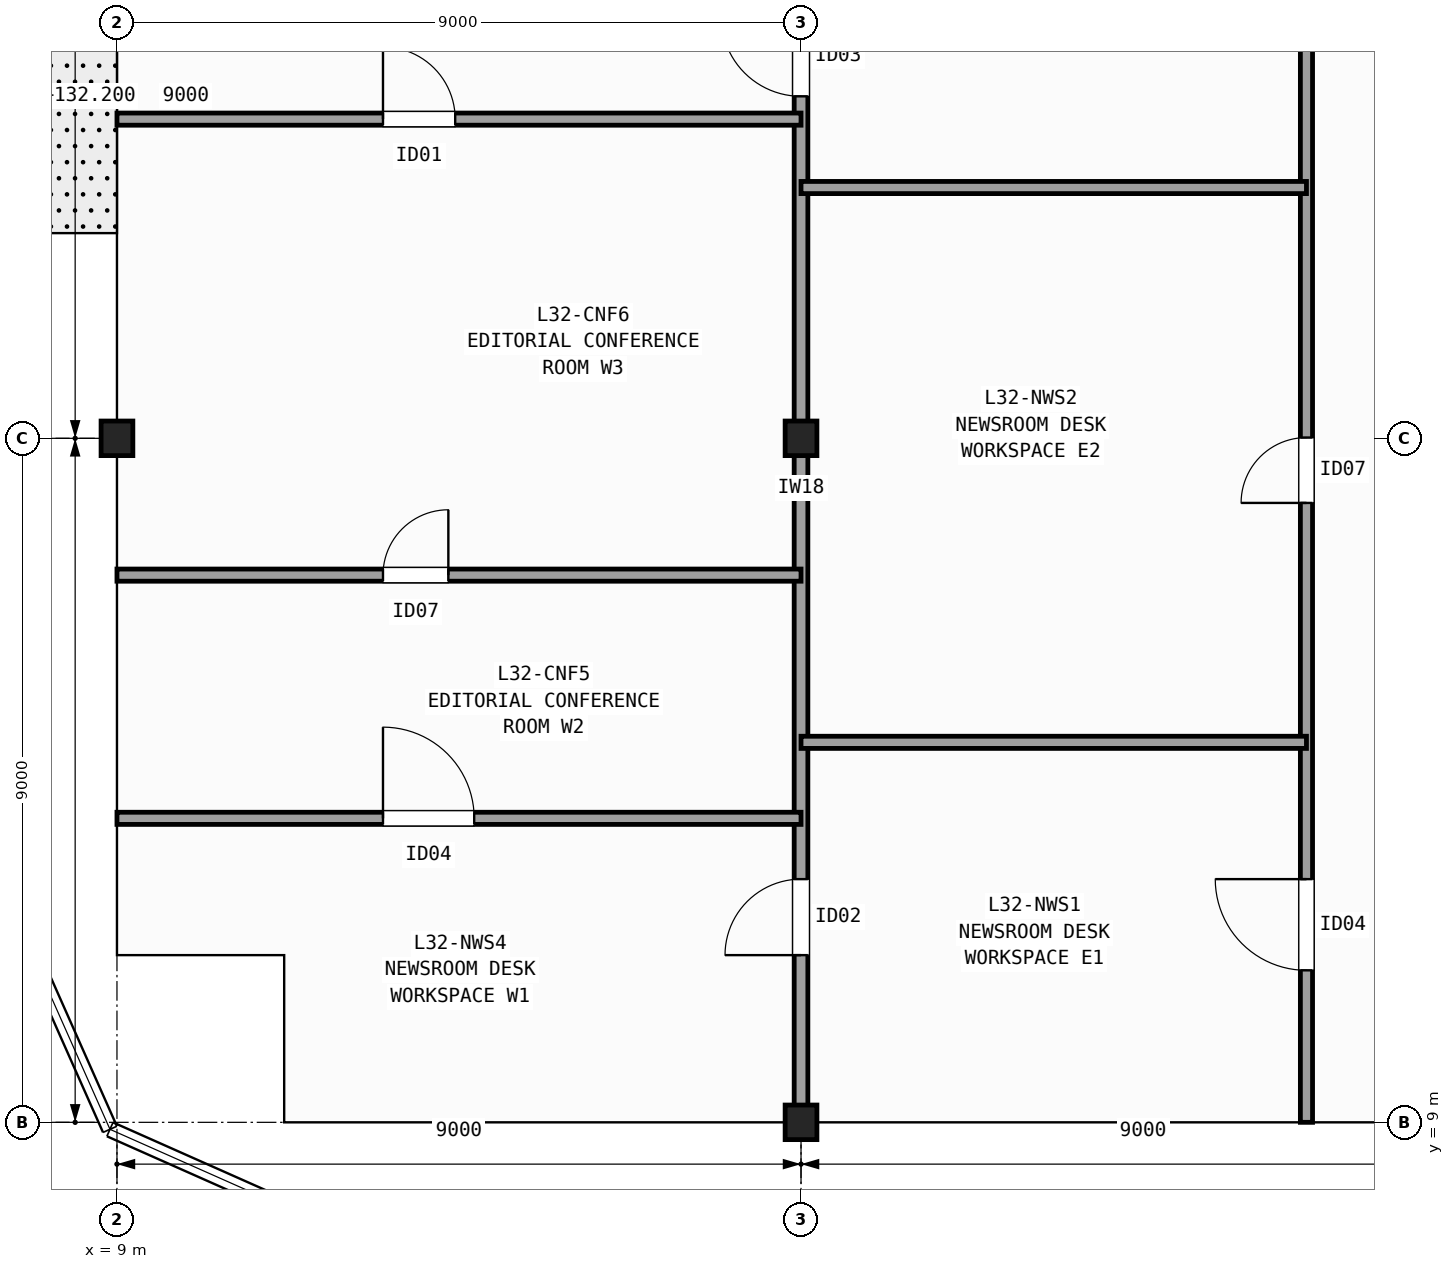
"""IFC4 building model, lengths in metres.
Left out: names, types, materials, properties, quantities, classifications, styles, units other than length and angle.
Written with IfcOpenShell. Run it as: python <this file> out.ifc"""

import sys

from ifc_helpers import new_model, si_unit, direction, frame, frame_2d, origin, origin_2d, place, context, subcontext, project, spatial, rectangle, i_section, extrude, element, fill, save


model = new_model("IFC4")
c1 = context("Model", 3, precision=1e-05, world=origin(), true_north=direction((0.0, 1.0)))
c2 = subcontext(c1, "Body", "Model", "MODEL_VIEW")
j1 = project(units=[si_unit("LENGTHUNIT", "METRE"), si_unit("PLANEANGLEUNIT", "RADIAN")], contexts=[c1])
p1 = place(None, origin())
s1 = spatial("IfcSite", under=j1, at=p1, CompositionType="ELEMENT")
p2 = place(p1, origin())
s2 = spatial("IfcBuilding", under=s1, at=p2, CompositionType="ELEMENT")
p3 = place(p2, frame((0.0, 0.0, 132.2)))
s3 = spatial("IfcBuildingStorey", under=s2, at=p3, CompositionType="ELEMENT", Elevation=132.2)
for number, where, z_axis, x_axis in (
    (1, (9.0, 18.0, 0.0), (0.0, 0.0, 1.0), (1.0, 0.0, 0.0)),
    (2, (18.0, 9.0, 0.0), (0.0, 0.0, 1.0), (1.0, 0.0, 0.0)),
    (3, (18.0, 18.0, 0.0), (0.0, 0.0, 1.0), (1.0, 0.0, 0.0)),
):
    element("IfcColumn", number, at=place(p3, frame(where, z_axis=z_axis, x_axis=x_axis)), inside=s3, PredefinedType="COLUMN", context=c2, shape_type="SweptSolid", body=[
        extrude(i_section(OverallWidth=0.418, OverallDepth=0.455, WebThickness=0.042, FlangeThickness=0.068, FilletRadius=0.015, at=origin_2d()), origin(), (0.0, 0.0, 1.0), 3.7),
    ])
p4 = place(p3, frame((24.65, 9.0, 0.0), z_axis=(0.0, 0.0, 1.0), x_axis=(0.0, 1.0, 0.0)))
e4 = element("IfcWall", 4, at=p4, inside=s3, PredefinedType="PARTITIONING", context=c2, shape_type="SweptSolid", body=[
    extrude(rectangle(XDim=19.2, YDim=0.16, at=frame_2d((9.6, 0.0))), origin(), (0.0, 0.0, 1.0), 2.634),
])
p5 = place(p4, frame((2.0, 0.0, 0.0)))
e5 = element("IfcOpeningElement", 5, at=p5, cuts=e4, PredefinedType="OPENING", context=c2, shape_type="SweptSolid", body=[
    extrude(rectangle(XDim=1.2, YDim=2.15, at=frame_2d((0.6, 1.075))), frame((0.0, 0.09, 0.0), z_axis=(0.0, -1.0, 0.0), x_axis=(1.0, 0.0, 0.0)), (0.0, 0.0, 1.0), 0.18),
])
p6 = place(p4, frame((8.15, 0.0, 0.0)))
e6 = element("IfcOpeningElement", 6, at=p6, cuts=e4, PredefinedType="OPENING", context=c2, shape_type="SweptSolid", body=[
    extrude(rectangle(XDim=0.86, YDim=2.05, at=frame_2d((0.43, 1.025))), frame((0.0, 0.09, 0.0), z_axis=(0.0, -1.0, 0.0), x_axis=(1.0, 0.0, 0.0)), (0.0, 0.0, 1.0), 0.18),
])
p7 = place(p4, frame((15.215, 0.0, 0.0)))
e7 = element("IfcOpeningElement", 7, at=p7, cuts=e4, PredefinedType="OPENING", context=c2, shape_type="SweptSolid", body=[
    extrude(rectangle(XDim=0.95, YDim=2.1, at=frame_2d((0.475, 1.05))), frame((0.0, 0.09, 0.0), z_axis=(0.0, -1.0, 0.0), x_axis=(1.0, 0.0, 0.0)), (0.0, 0.0, 1.0), 0.18),
])
p8 = place(p3, frame((18.0, 9.0, 0.0), z_axis=(0.0, 0.0, 1.0), x_axis=(0.0, 1.0, 0.0)))
e8 = element("IfcWall", 8, at=p8, inside=s3, PredefinedType="PARTITIONING", context=c2, shape_type="SweptSolid", body=[
    extrude(rectangle(XDim=19.13, YDim=0.18, at=frame_2d((9.565, 0.0))), origin(), (0.0, 0.0, 1.0), 2.634),
])
p9 = place(p8, frame((2.2, 0.0, 0.0)))
e9 = element("IfcOpeningElement", 9, at=p9, cuts=e8, PredefinedType="OPENING", context=c2, shape_type="SweptSolid", body=[
    extrude(rectangle(XDim=1.0, YDim=2.1, at=frame_2d((0.5, 1.05))), frame((0.0, 0.1, 0.0), z_axis=(0.0, -1.0, 0.0), x_axis=(1.0, 0.0, 0.0)), (0.0, 0.0, 1.0), 0.2),
])
p10 = place(p8, frame((13.5, 0.0, 0.0)))
e10 = element("IfcOpeningElement", 10, at=p10, cuts=e8, PredefinedType="OPENING", context=c2, shape_type="SweptSolid", body=[
    extrude(rectangle(XDim=1.05, YDim=2.15, at=frame_2d((0.525, 1.075))), frame((0.0, 0.1, 0.0), z_axis=(0.0, -1.0, 0.0), x_axis=(1.0, 0.0, 0.0)), (0.0, 0.0, 1.0), 0.2),
])
p11 = place(p3, frame((18.0, 14.0, 0.0), z_axis=(0.0, 0.0, 1.0), x_axis=(1.0, 0.0, 0.0)))
e11 = element("IfcWall", 11, at=p11, inside=s3, PredefinedType="PARTITIONING", context=c2, shape_type="SweptSolid", body=[
    extrude(rectangle(XDim=6.65, YDim=0.16, at=frame_2d((3.325, 0.0))), origin(), (0.0, 0.0, 1.0), 2.789),
])
p12 = place(p3, frame((18.0, 21.3, 0.0), z_axis=(0.0, 0.0, 1.0), x_axis=(1.0, 0.0, 0.0)))
e12 = element("IfcWall", 12, at=p12, inside=s3, PredefinedType="PARTITIONING", context=c2, shape_type="SweptSolid", body=[
    extrude(rectangle(XDim=6.65, YDim=0.16, at=frame_2d((3.325, 0.0))), origin(), (0.0, 0.0, 1.0), 2.792),
])
p13 = place(p3, frame((9.0, 13.0, 0.0), z_axis=(0.0, 0.0, 1.0), x_axis=(1.0, 0.0, 0.0)))
e13 = element("IfcWall", 13, at=p13, inside=s3, PredefinedType="PARTITIONING", context=c2, shape_type="SweptSolid", body=[
    extrude(rectangle(XDim=9.0, YDim=0.16, at=frame_2d((4.5, 0.0))), origin(), (0.0, 0.0, 1.0), 2.792),
])
p14 = place(p13, frame((3.5, 0.0, 0.0)))
e14 = element("IfcOpeningElement", 14, at=p14, cuts=e13, PredefinedType="OPENING", context=c2, shape_type="SweptSolid", body=[
    extrude(rectangle(XDim=1.2, YDim=2.15, at=frame_2d((0.6, 1.075))), frame((0.0, 0.09, 0.0), z_axis=(0.0, -1.0, 0.0), x_axis=(1.0, 0.0, 0.0)), (0.0, 0.0, 1.0), 0.18),
])
p15 = place(p3, frame((9.0, 16.2, 0.0), z_axis=(0.0, 0.0, 1.0), x_axis=(1.0, 0.0, 0.0)))
e15 = element("IfcWall", 15, at=p15, inside=s3, PredefinedType="PARTITIONING", context=c2, shape_type="SweptSolid", body=[
    extrude(rectangle(XDim=9.0, YDim=0.16, at=frame_2d((4.5, 0.0))), origin(), (0.0, 0.0, 1.0), 2.792),
])
p16 = place(p15, frame((3.5, 0.0, 0.0)))
e16 = element("IfcOpeningElement", 16, at=p16, cuts=e15, PredefinedType="OPENING", context=c2, shape_type="SweptSolid", body=[
    extrude(rectangle(XDim=0.86, YDim=2.05, at=frame_2d((0.43, 1.025))), frame((0.0, 0.09, 0.0), z_axis=(0.0, -1.0, 0.0), x_axis=(1.0, 0.0, 0.0)), (0.0, 0.0, 1.0), 0.18),
])
p17 = place(p3, frame((9.0, 22.2, 0.0), z_axis=(0.0, 0.0, 1.0), x_axis=(1.0, 0.0, 0.0)))
e17 = element("IfcWall", 17, at=p17, inside=s3, PredefinedType="PARTITIONING", context=c2, shape_type="SweptSolid", body=[
    extrude(rectangle(XDim=9.0, YDim=0.16, at=frame_2d((4.5, 0.0))), origin(), (0.0, 0.0, 1.0), 2.634),
])
p18 = place(p17, frame((3.5, 0.0, 0.0)))
e18 = element("IfcOpeningElement", 18, at=p18, cuts=e17, PredefinedType="OPENING", context=c2, shape_type="SweptSolid", body=[
    extrude(rectangle(XDim=0.95, YDim=2.1, at=frame_2d((0.475, 1.05))), frame((0.0, 0.09, 0.0), z_axis=(0.0, -1.0, 0.0), x_axis=(1.0, 0.0, 0.0)), (0.0, 0.0, 1.0), 0.18),
])
p19 = place(p5, origin())
e19 = element("IfcDoor", 19, at=p19, inside=s3, OperationType="SINGLE_SWING_RIGHT", PredefinedType="DOOR", context=c2, shape_type="SweptSolid", body=[
    extrude(rectangle(XDim=1.2, YDim=2.15, at=frame_2d((0.6, 1.075))), frame((0.0, 0.025, 0.0), z_axis=(0.0, -1.0, 0.0), x_axis=(1.0, 0.0, 0.0)), (0.0, 0.0, 1.0), 0.05),
])
fill(e5, e19)
p20 = place(p6, origin())
e20 = element("IfcDoor", 20, at=p20, inside=s3, OperationType="SINGLE_SWING_LEFT", PredefinedType="DOOR", context=c2, shape_type="SweptSolid", body=[
    extrude(rectangle(XDim=0.86, YDim=2.05, at=frame_2d((0.43, 1.025))), frame((0.0, 0.025, 0.0), z_axis=(0.0, -1.0, 0.0), x_axis=(1.0, 0.0, 0.0)), (0.0, 0.0, 1.0), 0.05),
])
fill(e6, e20)
p21 = place(p9, origin())
e21 = element("IfcDoor", 21, at=p21, inside=s3, OperationType="SINGLE_SWING_LEFT", PredefinedType="DOOR", context=c2, shape_type="SweptSolid", body=[
    extrude(rectangle(XDim=1.0, YDim=2.1, at=frame_2d((0.5, 1.05))), frame((0.0, 0.025, 0.0), z_axis=(0.0, -1.0, 0.0), x_axis=(1.0, 0.0, 0.0)), (0.0, 0.0, 1.0), 0.05),
])
fill(e9, e21)
p22 = place(p10, origin())
e22 = element("IfcDoor", 22, at=p22, inside=s3, OperationType="SINGLE_SWING_RIGHT", PredefinedType="DOOR", context=c2, shape_type="SweptSolid", body=[
    extrude(rectangle(XDim=1.05, YDim=2.15, at=frame_2d((0.525, 1.075))), frame((0.0, 0.025, 0.0), z_axis=(0.0, -1.0, 0.0), x_axis=(1.0, 0.0, 0.0)), (0.0, 0.0, 1.0), 0.05),
])
fill(e10, e22)
p23 = place(p14, origin())
e23 = element("IfcDoor", 23, at=p23, inside=s3, OperationType="SINGLE_SWING_LEFT", PredefinedType="DOOR", context=c2, shape_type="SweptSolid", body=[
    extrude(rectangle(XDim=1.2, YDim=2.15, at=frame_2d((0.6, 1.075))), frame((0.0, 0.025, 0.0), z_axis=(0.0, -1.0, 0.0), x_axis=(1.0, 0.0, 0.0)), (0.0, 0.0, 1.0), 0.05),
])
fill(e14, e23)
p24 = place(p16, origin())
e24 = element("IfcDoor", 24, at=p24, inside=s3, OperationType="SINGLE_SWING_RIGHT", PredefinedType="DOOR", context=c2, shape_type="SweptSolid", body=[
    extrude(rectangle(XDim=0.86, YDim=2.05, at=frame_2d((0.43, 1.025))), frame((0.0, 0.025, 0.0), z_axis=(0.0, -1.0, 0.0), x_axis=(1.0, 0.0, 0.0)), (0.0, 0.0, 1.0), 0.05),
])
fill(e16, e24)
p25 = place(p18, origin())
e25 = element("IfcDoor", 25, at=p25, inside=s3, OperationType="SINGLE_SWING_LEFT", PredefinedType="DOOR", context=c2, shape_type="SweptSolid", body=[
    extrude(rectangle(XDim=0.95, YDim=2.1, at=frame_2d((0.475, 1.05))), frame((0.0, 0.025, 0.0), z_axis=(0.0, -1.0, 0.0), x_axis=(1.0, 0.0, 0.0)), (0.0, 0.0, 1.0), 0.05),
])
fill(e18, e25)
save(model, sys.argv[1])
